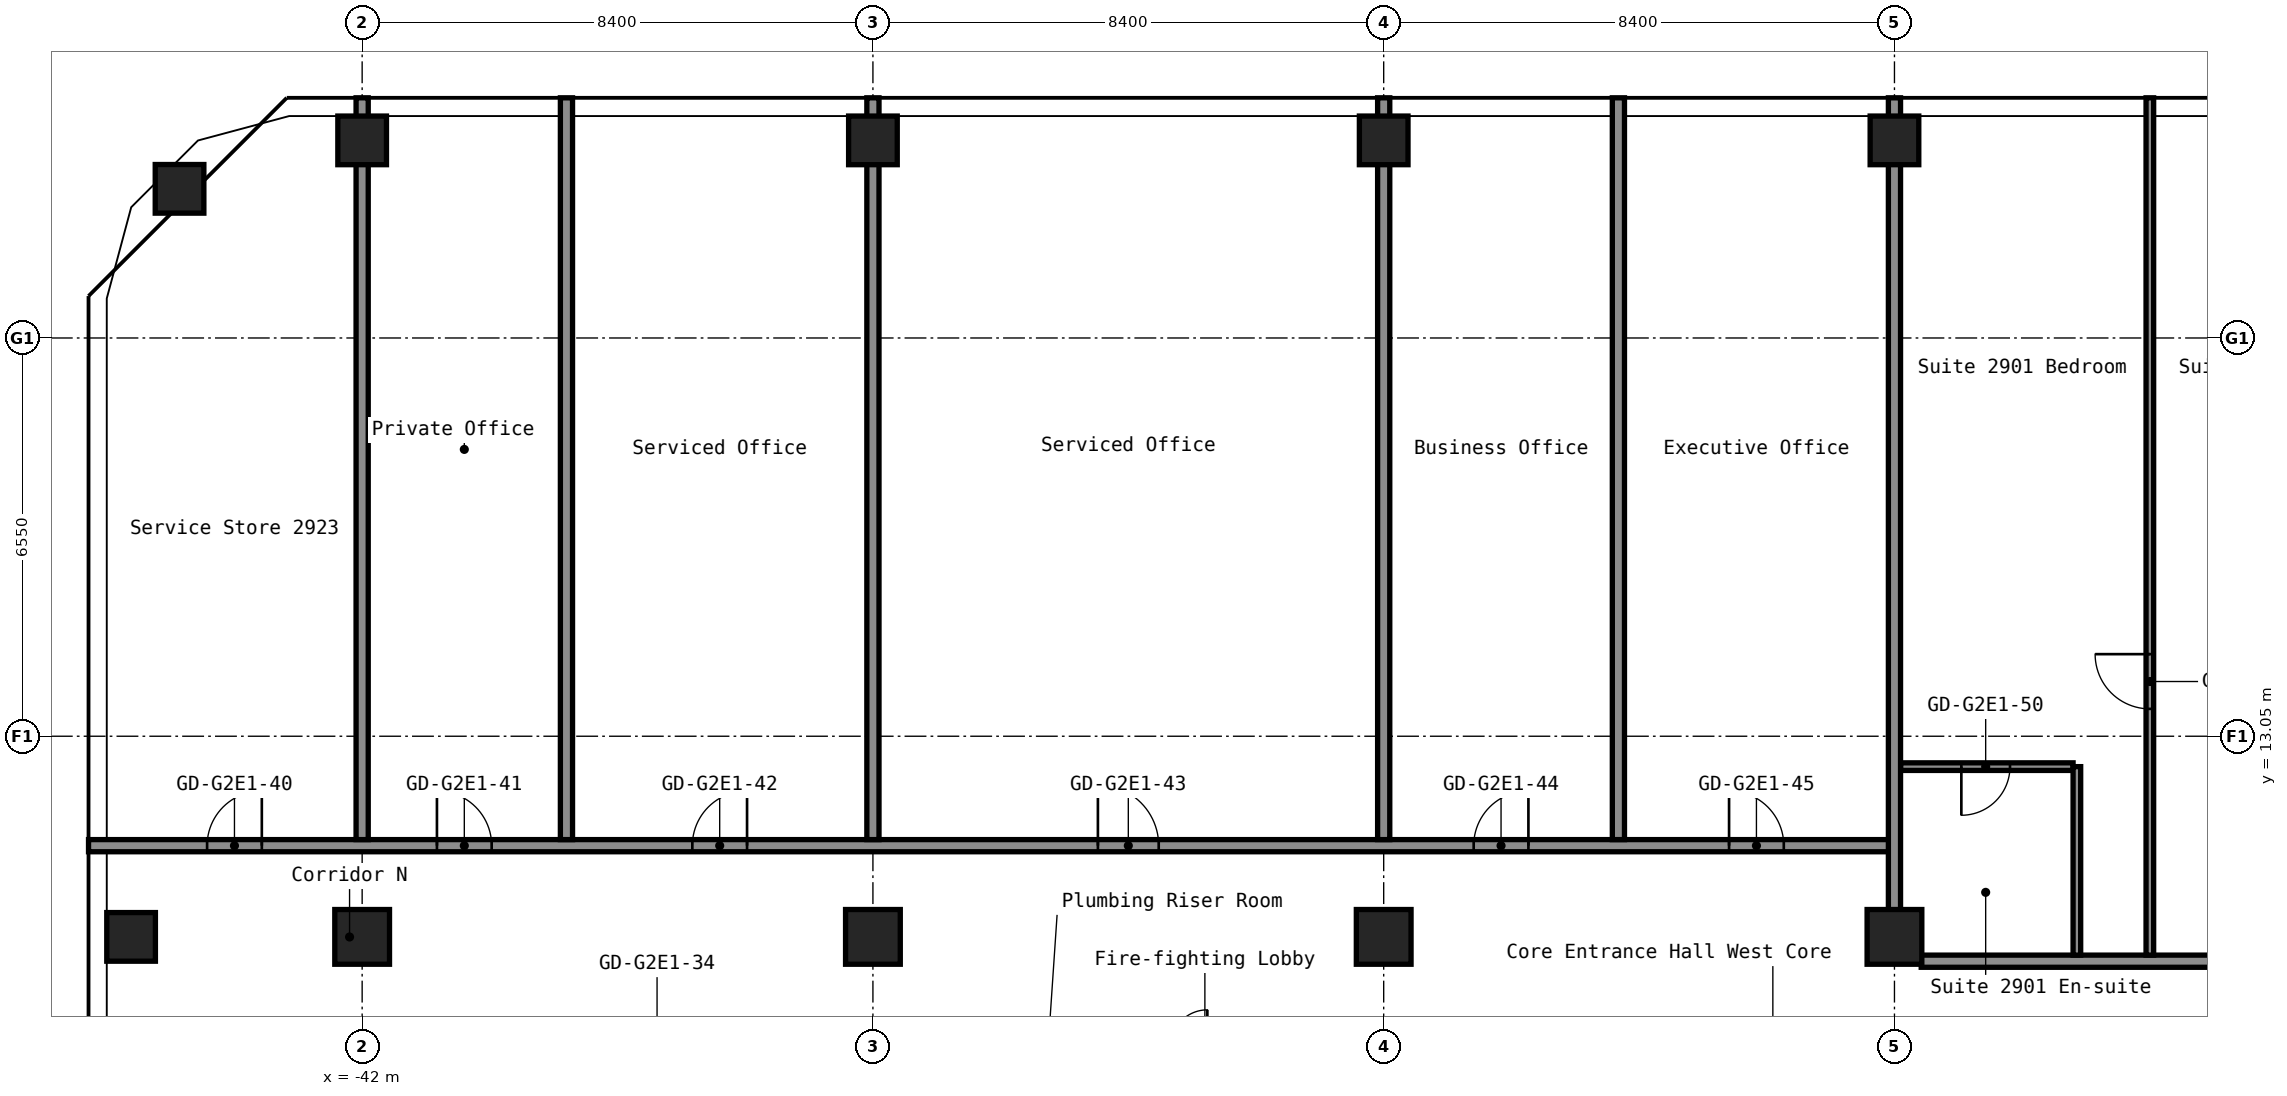
"""IFC4 building model, lengths in metres.
Left out: names, types, materials, properties, quantities, classifications, styles, units other than length and angle.
Written with IfcOpenShell. Run it as: python <this file> out.ifc"""

import sys

from ifc_helpers import new_model, si_unit, direction, frame, frame_2d, origin, origin_2d, place, context, subcontext, project, spatial, rectangle, hollow_rectangle, extrude, element, fill, save


model = new_model("IFC4")
c1 = context("Model", 3, precision=1e-05, world=origin(), true_north=direction((0.0, 1.0)))
c2 = subcontext(c1, "Body", "Model", "MODEL_VIEW")
j1 = project(units=[si_unit("LENGTHUNIT", "METRE"), si_unit("PLANEANGLEUNIT", "RADIAN")], contexts=[c1])
p1 = place(None, origin())
s1 = spatial("IfcSite", under=j1, at=p1, CompositionType="ELEMENT")
p2 = place(p1, origin())
s2 = spatial("IfcBuilding", under=s1, at=p2, CompositionType="ELEMENT")
p3 = place(p2, frame((0.0, 0.0, 104.2)))
s3 = spatial("IfcBuildingStorey", under=s2, at=p3, CompositionType="ELEMENT", Elevation=104.2)
for number, where, z_axis, x_axis in (
    (1, (-45.8, 9.75, 0.0), (0.0, 0.0, 1.0), (1.0, 0.0, 0.0)),
    (2, (-45.003, 22.053, 0.0), (0.0, 0.0, 1.0), (1.0, 0.0, 0.0)),
):
    element("IfcColumn", number, at=place(p3, frame(where, z_axis=z_axis, x_axis=x_axis)), inside=s3, PredefinedType="COLUMN", context=c2, shape_type="SweptSolid", body=[
        extrude(hollow_rectangle(XDim=0.8, YDim=0.8, WallThickness=0.032, at=origin_2d()), origin(), (0.0, 0.0, 1.0), 2.8),
    ])
p4 = place(p3, frame((-42.0, 9.75, 0.0), z_axis=(0.0, 0.0, 1.0), x_axis=(1.0, 0.0, 0.0)))
e3 = element("IfcColumn", 3, at=p4, inside=s3, PredefinedType="COLUMN", context=c2, shape_type="SweptSolid", body=[
    extrude(hollow_rectangle(XDim=0.9, YDim=0.9, WallThickness=0.036, at=origin_2d()), origin(), (0.0, 0.0, 1.0), 2.8),
])
p5 = place(p3, frame((-42.0, 22.85, 0.0), z_axis=(0.0, 0.0, 1.0), x_axis=(1.0, 0.0, 0.0)))
e4 = element("IfcColumn", 4, at=p5, inside=s3, PredefinedType="COLUMN", context=c2, shape_type="SweptSolid", body=[
    extrude(hollow_rectangle(XDim=0.8, YDim=0.8, WallThickness=0.032, at=origin_2d()), origin(), (0.0, 0.0, 1.0), 2.8),
])
p6 = place(p3, frame((-33.6, 9.75, 0.0), z_axis=(0.0, 0.0, 1.0), x_axis=(1.0, 0.0, 0.0)))
e5 = element("IfcColumn", 5, at=p6, inside=s3, PredefinedType="COLUMN", context=c2, shape_type="SweptSolid", body=[
    extrude(hollow_rectangle(XDim=0.9, YDim=0.9, WallThickness=0.036, at=origin_2d()), origin(), (0.0, 0.0, 1.0), 2.8),
])
p7 = place(p3, frame((-33.6, 22.85, 0.0), z_axis=(0.0, 0.0, 1.0), x_axis=(1.0, 0.0, 0.0)))
e6 = element("IfcColumn", 6, at=p7, inside=s3, PredefinedType="COLUMN", context=c2, shape_type="SweptSolid", body=[
    extrude(hollow_rectangle(XDim=0.8, YDim=0.8, WallThickness=0.032, at=origin_2d()), origin(), (0.0, 0.0, 1.0), 2.8),
])
p8 = place(p3, frame((-25.2, 9.75, 0.0), z_axis=(0.0, 0.0, 1.0), x_axis=(1.0, 0.0, 0.0)))
e7 = element("IfcColumn", 7, at=p8, inside=s3, PredefinedType="COLUMN", context=c2, shape_type="SweptSolid", body=[
    extrude(hollow_rectangle(XDim=0.9, YDim=0.9, WallThickness=0.036, at=origin_2d()), origin(), (0.0, 0.0, 1.0), 2.8),
])
p9 = place(p3, frame((-25.2, 22.85, 0.0), z_axis=(0.0, 0.0, 1.0), x_axis=(1.0, 0.0, 0.0)))
e8 = element("IfcColumn", 8, at=p9, inside=s3, PredefinedType="COLUMN", context=c2, shape_type="SweptSolid", body=[
    extrude(hollow_rectangle(XDim=0.8, YDim=0.8, WallThickness=0.032, at=origin_2d()), origin(), (0.0, 0.0, 1.0), 2.8),
])
p10 = place(p3, frame((-16.8, 9.75, 0.0), z_axis=(0.0, 0.0, 1.0), x_axis=(1.0, 0.0, 0.0)))
e9 = element("IfcColumn", 9, at=p10, inside=s3, PredefinedType="COLUMN", context=c2, shape_type="SweptSolid", body=[
    extrude(hollow_rectangle(XDim=0.9, YDim=0.9, WallThickness=0.036, at=origin_2d()), origin(), (0.0, 0.0, 1.0), 2.8),
])
p11 = place(p3, frame((-16.8, 22.85, 0.0), z_axis=(0.0, 0.0, 1.0), x_axis=(1.0, 0.0, 0.0)))
e10 = element("IfcColumn", 10, at=p11, inside=s3, PredefinedType="COLUMN", context=c2, shape_type="SweptSolid", body=[
    extrude(hollow_rectangle(XDim=0.8, YDim=0.8, WallThickness=0.032, at=origin_2d()), origin(), (0.0, 0.0, 1.0), 2.8),
])
p12 = place(p3, frame((-16.36, 9.35, 0.0), z_axis=(0.0, 0.0, 1.0), x_axis=(1.0, 0.0, 0.0)))
e11 = element("IfcWall", 11, at=p12, inside=s3, PredefinedType="PARTITIONING", context=c2, shape_type="SweptSolid", body=[
    extrude(rectangle(XDim=32.72, YDim=0.2, at=frame_2d((16.36, 0.0))), origin(), (0.0, 0.0, 1.0), 2.8),
])
p13 = place(p12, frame((5.36, 0.0, 0.0)))
e12 = element("IfcOpeningElement", 12, at=p13, cuts=e11, PredefinedType="OPENING", context=c2, shape_type="SweptSolid", body=[
    extrude(rectangle(XDim=1.0, YDim=2.1, at=frame_2d((0.5, 1.05))), frame((0.0, 0.11, 0.0), z_axis=(0.0, -1.0, 0.0), x_axis=(1.0, 0.0, 0.0)), (0.0, 0.0, 1.0), 0.22),
])
p14 = place(p12, frame((13.76, 0.0, 0.0)))
e13 = element("IfcOpeningElement", 13, at=p14, cuts=e11, PredefinedType="OPENING", context=c2, shape_type="SweptSolid", body=[
    extrude(rectangle(XDim=1.0, YDim=2.1, at=frame_2d((0.5, 1.05))), frame((0.0, 0.11, 0.0), z_axis=(0.0, -1.0, 0.0), x_axis=(1.0, 0.0, 0.0)), (0.0, 0.0, 1.0), 0.22),
])
p15 = place(p12, frame((22.16, 0.0, 0.0)))
e14 = element("IfcOpeningElement", 14, at=p15, cuts=e11, PredefinedType="OPENING", context=c2, shape_type="SweptSolid", body=[
    extrude(rectangle(XDim=1.0, YDim=2.1, at=frame_2d((0.5, 1.05))), frame((0.0, 0.11, 0.0), z_axis=(0.0, -1.0, 0.0), x_axis=(1.0, 0.0, 0.0)), (0.0, 0.0, 1.0), 0.22),
])
p16 = place(p12, frame((26.36, 0.0, 0.0)))
e15 = element("IfcOpeningElement", 15, at=p16, cuts=e11, PredefinedType="OPENING", context=c2, shape_type="SweptSolid", body=[
    extrude(rectangle(XDim=1.0, YDim=2.1, at=frame_2d((0.5, 1.05))), frame((0.0, 0.11, 0.0), z_axis=(0.0, -1.0, 0.0), x_axis=(1.0, 0.0, 0.0)), (0.0, 0.0, 1.0), 0.22),
])
p17 = place(p3, frame((-46.5, 11.25, 0.0), z_axis=(0.0, 0.0, 1.0), x_axis=(1.0, 0.0, 0.0)))
e16 = element("IfcWall", 16, at=p17, inside=s3, PredefinedType="PARTITIONING", context=c2, shape_type="SweptSolid", body=[
    extrude(rectangle(XDim=29.7, YDim=0.2, at=frame_2d((14.85, 0.0))), origin(), (0.0, 0.0, 1.0), 2.8),
])
p18 = place(p17, frame((1.95, 0.0, 0.0)))
e17 = element("IfcOpeningElement", 17, at=p18, cuts=e16, PredefinedType="OPENING", context=c2, shape_type="SweptSolid", body=[
    extrude(rectangle(XDim=0.9, YDim=2.1, at=frame_2d((0.45, 1.05))), frame((0.0, 0.11, 0.0), z_axis=(0.0, -1.0, 0.0), x_axis=(1.0, 0.0, 0.0)), (0.0, 0.0, 1.0), 0.22),
])
p19 = place(p17, frame((5.73, 0.0, 0.0)))
e18 = element("IfcOpeningElement", 18, at=p19, cuts=e16, PredefinedType="OPENING", context=c2, shape_type="SweptSolid", body=[
    extrude(rectangle(XDim=0.9, YDim=2.1, at=frame_2d((0.45, 1.05))), frame((0.0, 0.11, 0.0), z_axis=(0.0, -1.0, 0.0), x_axis=(1.0, 0.0, 0.0)), (0.0, 0.0, 1.0), 0.22),
])
p20 = place(p17, frame((9.93, 0.0, 0.0)))
e19 = element("IfcOpeningElement", 19, at=p20, cuts=e16, PredefinedType="OPENING", context=c2, shape_type="SweptSolid", body=[
    extrude(rectangle(XDim=0.9, YDim=2.1, at=frame_2d((0.45, 1.05))), frame((0.0, 0.11, 0.0), z_axis=(0.0, -1.0, 0.0), x_axis=(1.0, 0.0, 0.0)), (0.0, 0.0, 1.0), 0.22),
])
p21 = place(p17, frame((16.6, 0.0, 0.0)))
e20 = element("IfcOpeningElement", 20, at=p21, cuts=e16, PredefinedType="OPENING", context=c2, shape_type="SweptSolid", body=[
    extrude(rectangle(XDim=1.0, YDim=2.1, at=frame_2d((0.5, 1.05))), frame((0.0, 0.11, 0.0), z_axis=(0.0, -1.0, 0.0), x_axis=(1.0, 0.0, 0.0)), (0.0, 0.0, 1.0), 0.22),
])
p22 = place(p17, frame((22.78, 0.0, 0.0)))
e21 = element("IfcOpeningElement", 21, at=p22, cuts=e16, PredefinedType="OPENING", context=c2, shape_type="SweptSolid", body=[
    extrude(rectangle(XDim=0.9, YDim=2.1, at=frame_2d((0.45, 1.05))), frame((0.0, 0.11, 0.0), z_axis=(0.0, -1.0, 0.0), x_axis=(1.0, 0.0, 0.0)), (0.0, 0.0, 1.0), 0.22),
])
p23 = place(p17, frame((26.98, 0.0, 0.0)))
e22 = element("IfcOpeningElement", 22, at=p23, cuts=e16, PredefinedType="OPENING", context=c2, shape_type="SweptSolid", body=[
    extrude(rectangle(XDim=0.9, YDim=2.1, at=frame_2d((0.45, 1.05))), frame((0.0, 0.11, 0.0), z_axis=(0.0, -1.0, 0.0), x_axis=(1.0, 0.0, 0.0)), (0.0, 0.0, 1.0), 0.22),
])
p24 = place(p3, frame((-16.7, 12.55, 0.0), z_axis=(0.0, 0.0, 1.0), x_axis=(1.0, 0.0, 0.0)))
e23 = element("IfcWall", 23, at=p24, inside=s3, PredefinedType="PARTITIONING", context=c2, shape_type="SweptSolid", body=[
    extrude(rectangle(XDim=2.837, YDim=0.125, at=frame_2d((1.419, 0.0))), origin(), (0.0, 0.0, 1.0), 2.8),
])
p25 = place(p24, frame((1.0, 0.0, 0.0)))
e24 = element("IfcOpeningElement", 24, at=p25, cuts=e23, PredefinedType="OPENING", context=c2, shape_type="SweptSolid", body=[
    extrude(rectangle(XDim=0.8, YDim=2.1, at=frame_2d((0.4, 1.05))), frame((0.0, 0.073, 0.0), z_axis=(0.0, -1.0, 0.0), x_axis=(1.0, 0.0, 0.0)), (0.0, 0.0, 1.0), 0.145),
])
for number, where, z_axis, x_axis in (
    (25, (-42.0, 11.35, 0.0), (0.0, 0.0, 1.0), (0.0, 1.0, 0.0)),
    (26, (-38.64, 11.35, 0.0), (0.0, 0.0, 1.0), (0.0, 1.0, 0.0)),
    (27, (-33.6, 11.35, 0.0), (0.0, 0.0, 1.0), (0.0, 1.0, 0.0)),
    (28, (-25.2, 11.35, 0.0), (0.0, 0.0, 1.0), (0.0, 1.0, 0.0)),
    (29, (-21.34, 11.35, 0.0), (0.0, 0.0, 1.0), (0.0, 1.0, 0.0)),
):
    element("IfcWall", number, at=place(p3, frame(where, z_axis=z_axis, x_axis=x_axis)), inside=s3, PredefinedType="PARTITIONING", context=c2, shape_type="SweptSolid", body=[
        extrude(rectangle(XDim=12.2, YDim=0.2, at=frame_2d((6.1, 0.0))), origin(), (0.0, 0.0, 1.0), 2.8),
    ])
p26 = place(p3, frame((-16.8, 10.19, 0.0), z_axis=(0.0, 0.0, 1.0), x_axis=(0.0, 1.0, 0.0)))
e30 = element("IfcWall", 30, at=p26, inside=s3, PredefinedType="PARTITIONING", context=c2, shape_type="SweptSolid", body=[
    extrude(rectangle(XDim=13.36, YDim=0.2, at=frame_2d((6.68, 0.0))), origin(), (0.0, 0.0, 1.0), 2.8),
])
p27 = place(p3, frame((-13.8, 9.45, 0.0), z_axis=(0.0, 0.0, 1.0), x_axis=(0.0, 1.0, 0.0)))
e31 = element("IfcWall", 31, at=p27, inside=s3, PredefinedType="PARTITIONING", context=c2, shape_type="SweptSolid", body=[
    extrude(rectangle(XDim=3.1, YDim=0.125, at=frame_2d((1.55, 0.0))), origin(), (0.0, 0.0, 1.0), 2.8),
])
p28 = place(p3, frame((-12.6, 9.45, 0.0), z_axis=(0.0, 0.0, 1.0), x_axis=(0.0, 1.0, 0.0)))
e32 = element("IfcWall", 32, at=p28, inside=s3, PredefinedType="PARTITIONING", context=c2, shape_type="SweptSolid", body=[
    extrude(rectangle(XDim=14.1, YDim=0.125, at=frame_2d((7.05, 0.0))), origin(), (0.0, 0.0, 1.0), 2.8),
])
p29 = place(p28, frame((4.05, 0.0, 0.0)))
e33 = element("IfcOpeningElement", 33, at=p29, cuts=e32, PredefinedType="OPENING", context=c2, shape_type="SweptSolid", body=[
    extrude(rectangle(XDim=0.9, YDim=2.1, at=frame_2d((0.45, 1.05))), frame((0.0, 0.073, 0.0), z_axis=(0.0, -1.0, 0.0), x_axis=(1.0, 0.0, 0.0)), (0.0, 0.0, 1.0), 0.145),
])
p30 = place(p18, origin())
e34 = element("IfcDoor", 34, at=p30, inside=s3, OperationType="SINGLE_SWING_LEFT", PredefinedType="DOOR", context=c2, shape_type="SweptSolid", body=[
    extrude(rectangle(XDim=0.9, YDim=2.1, at=frame_2d((0.45, 1.05))), frame((0.0, 0.025, 0.0), z_axis=(0.0, -1.0, 0.0), x_axis=(1.0, 0.0, 0.0)), (0.0, 0.0, 1.0), 0.05),
])
fill(e17, e34)
p31 = place(p19, origin())
e35 = element("IfcDoor", 35, at=p31, inside=s3, OperationType="SINGLE_SWING_RIGHT", PredefinedType="DOOR", context=c2, shape_type="SweptSolid", body=[
    extrude(rectangle(XDim=0.9, YDim=2.1, at=frame_2d((0.45, 1.05))), frame((0.0, 0.025, 0.0), z_axis=(0.0, -1.0, 0.0), x_axis=(1.0, 0.0, 0.0)), (0.0, 0.0, 1.0), 0.05),
])
fill(e18, e35)
p32 = place(p20, origin())
e36 = element("IfcDoor", 36, at=p32, inside=s3, OperationType="SINGLE_SWING_LEFT", PredefinedType="DOOR", context=c2, shape_type="SweptSolid", body=[
    extrude(rectangle(XDim=0.9, YDim=2.1, at=frame_2d((0.45, 1.05))), frame((0.0, 0.025, 0.0), z_axis=(0.0, -1.0, 0.0), x_axis=(1.0, 0.0, 0.0)), (0.0, 0.0, 1.0), 0.05),
])
fill(e19, e36)
p33 = place(p21, origin())
e37 = element("IfcDoor", 37, at=p33, inside=s3, OperationType="SINGLE_SWING_RIGHT", PredefinedType="DOOR", context=c2, shape_type="SweptSolid", body=[
    extrude(rectangle(XDim=1.0, YDim=2.1, at=frame_2d((0.5, 1.05))), frame((0.0, 0.025, 0.0), z_axis=(0.0, -1.0, 0.0), x_axis=(1.0, 0.0, 0.0)), (0.0, 0.0, 1.0), 0.05),
])
fill(e20, e37)
p34 = place(p22, origin())
e38 = element("IfcDoor", 38, at=p34, inside=s3, OperationType="SINGLE_SWING_LEFT", PredefinedType="DOOR", context=c2, shape_type="SweptSolid", body=[
    extrude(rectangle(XDim=0.9, YDim=2.1, at=frame_2d((0.45, 1.05))), frame((0.0, 0.025, 0.0), z_axis=(0.0, -1.0, 0.0), x_axis=(1.0, 0.0, 0.0)), (0.0, 0.0, 1.0), 0.05),
])
fill(e21, e38)
p35 = place(p23, origin())
e39 = element("IfcDoor", 39, at=p35, inside=s3, OperationType="SINGLE_SWING_RIGHT", PredefinedType="DOOR", context=c2, shape_type="SweptSolid", body=[
    extrude(rectangle(XDim=0.9, YDim=2.1, at=frame_2d((0.45, 1.05))), frame((0.0, 0.025, 0.0), z_axis=(0.0, -1.0, 0.0), x_axis=(1.0, 0.0, 0.0)), (0.0, 0.0, 1.0), 0.05),
])
fill(e22, e39)
p36 = place(p25, origin())
e40 = element("IfcDoor", 40, at=p36, inside=s3, OperationType="SINGLE_SWING_LEFT", PredefinedType="DOOR", context=c2, shape_type="SweptSolid", body=[
    extrude(rectangle(XDim=0.8, YDim=2.1, at=frame_2d((0.4, 1.05))), frame((0.0, 0.025, 0.0), z_axis=(0.0, -1.0, 0.0), x_axis=(1.0, 0.0, 0.0)), (0.0, 0.0, 1.0), 0.05),
])
fill(e24, e40)
p37 = place(p29, origin())
e41 = element("IfcDoor", 41, at=p37, inside=s3, OperationType="SINGLE_SWING_LEFT", PredefinedType="DOOR", context=c2, shape_type="SweptSolid", body=[
    extrude(rectangle(XDim=0.9, YDim=2.1, at=frame_2d((0.45, 1.05))), frame((0.0, 0.025, 0.0), z_axis=(0.0, -1.0, 0.0), x_axis=(1.0, 0.0, 0.0)), (0.0, 0.0, 1.0), 0.05),
])
fill(e33, e41)
save(model, sys.argv[1])
